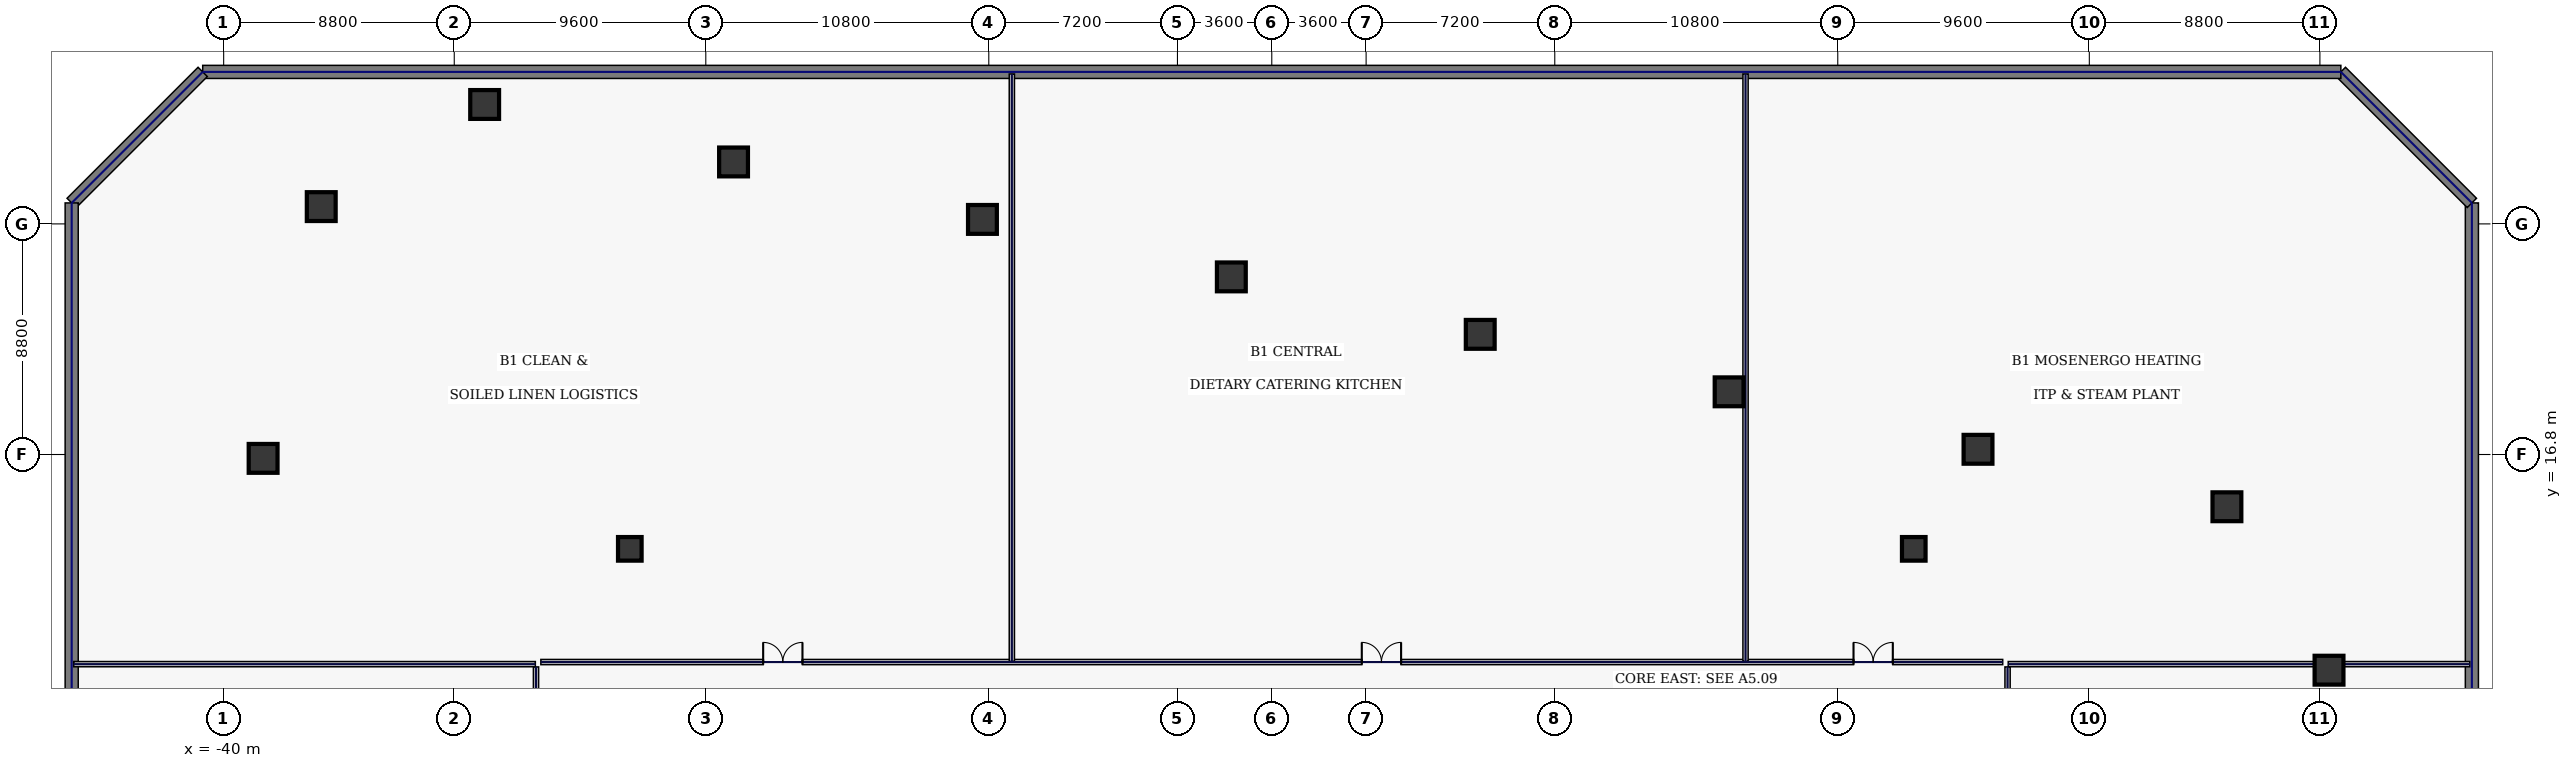
"""IFC4 building model, lengths in metres.
Left out: names, types, materials, properties, quantities, classifications, styles, units other than length and angle.
Written with IfcOpenShell. Run it as: python <this file> out.ifc"""

import sys

from ifc_helpers import new_model, si_unit, direction, frame, frame_2d, origin, origin_2d, place, context, subcontext, project, spatial, rectangle, extrude, element, fill, save


model = new_model("IFC4")
c1 = context("Model", 3, precision=1e-05, world=origin(), true_north=direction((0.0, 1.0)))
c2 = subcontext(c1, "Body", "Model", "MODEL_VIEW")
j1 = project(units=[si_unit("LENGTHUNIT", "METRE"), si_unit("PLANEANGLEUNIT", "RADIAN")], contexts=[c1])
p1 = place(None, origin())
s1 = spatial("IfcSite", under=j1, at=p1, CompositionType="ELEMENT")
p2 = place(p1, origin())
s2 = spatial("IfcBuilding", under=s1, at=p2, CompositionType="ELEMENT")
p3 = place(p2, frame((0.0, 0.0, -5.4)))
s3 = spatial("IfcBuildingStorey", under=s2, at=p3, CompositionType="ELEMENT", Elevation=-5.4)
p4 = place(p3, frame((45.8, -29.8, 0.0), z_axis=(0.0, 0.0, 1.0), x_axis=(0.0, 1.0, 0.0)))
e1 = element("IfcWall", 1, at=p4, inside=s3, PredefinedType="SHEAR", context=c2, shape_type="SweptSolid", body=[
    extrude(rectangle(XDim=56.2, YDim=0.5, at=frame_2d((28.1, 0.0))), origin(), (0.0, 0.0, 1.0), 5.05),
])
p5 = place(p3, frame((45.8, 26.4, 0.0), z_axis=(0.0, 0.0, 1.0), x_axis=(-0.707106781187, 0.707106781187, 0.0)))
e2 = element("IfcWall", 2, at=p5, inside=s3, PredefinedType="SHEAR", context=c2, shape_type="SweptSolid", body=[
    extrude(rectangle(XDim=7.071, YDim=0.5, at=frame_2d((3.536, 0.0))), origin(), (0.0, 0.0, 1.0), 5.05),
])
p6 = place(p3, frame((40.8, 31.4, 0.0), z_axis=(0.0, 0.0, 1.0), x_axis=(-1.0, 0.0, 0.0)))
e3 = element("IfcWall", 3, at=p6, inside=s3, PredefinedType="SHEAR", context=c2, shape_type="SweptSolid", body=[
    extrude(rectangle(XDim=81.6, YDim=0.5, at=frame_2d((40.8, 0.0))), origin(), (0.0, 0.0, 1.0), 5.05),
])
p7 = place(p3, frame((-40.8, 31.4, 0.0), z_axis=(0.0, 0.0, 1.0), x_axis=(-0.707106781187, -0.707106781187, 0.0)))
e4 = element("IfcWall", 4, at=p7, inside=s3, PredefinedType="SHEAR", context=c2, shape_type="SweptSolid", body=[
    extrude(rectangle(XDim=7.071, YDim=0.5, at=frame_2d((3.536, 0.0))), origin(), (0.0, 0.0, 1.0), 5.05),
])
p8 = place(p3, frame((-45.8, 26.4, 0.0), z_axis=(0.0, 0.0, 1.0), x_axis=(0.0, -1.0, 0.0)))
e5 = element("IfcWall", 5, at=p8, inside=s3, PredefinedType="SHEAR", context=c2, shape_type="SweptSolid", body=[
    extrude(rectangle(XDim=56.2, YDim=0.5, at=frame_2d((28.1, 0.0))), origin(), (0.0, 0.0, 1.0), 5.05),
])
for number, where, z_axis, x_axis in (
    (6, (-24.5, 13.2, 0.0), (0.0, 0.0, 1.0), (1.0, 0.0, 0.0)),
    (7, (24.5, 13.2, 0.0), (0.0, 0.0, 1.0), (1.0, 0.0, 0.0)),
):
    element("IfcColumn", number, at=place(p3, frame(where, z_axis=z_axis, x_axis=x_axis)), inside=s3, PredefinedType="COLUMN", context=c2, shape_type="SweptSolid", body=[
        extrude(rectangle(XDim=0.9, YDim=0.9, at=origin_2d()), origin(), (0.0, 0.0, 1.0), 5.05),
    ])
for number, where, z_axis, x_axis in (
    (8, (36.451, 14.806, 0.0), (0.0, 0.0, 1.0), (1.0, 0.0, 0.0)),
    (9, (26.952, 16.999, 0.0), (0.0, 0.0, 1.0), (1.0, 0.0, 0.0)),
    (10, (17.454, 19.192, 0.0), (0.0, 0.0, 1.0), (1.0, 0.0, 0.0)),
    (11, (7.955, 21.385, 0.0), (0.0, 0.0, 1.0), (1.0, 0.0, 0.0)),
    (12, (-1.544, 23.578, 0.0), (0.0, 0.0, 1.0), (1.0, 0.0, 0.0)),
    (13, (-11.042, 25.771, 0.0), (0.0, 0.0, 1.0), (1.0, 0.0, 0.0)),
    (14, (-20.541, 27.964, 0.0), (0.0, 0.0, 1.0), (1.0, 0.0, 0.0)),
    (15, (-30.04, 30.156, 0.0), (0.0, 0.0, 1.0), (1.0, 0.0, 0.0)),
    (16, (40.348, 8.57, 0.0), (0.0, 0.0, 1.0), (1.0, 0.0, 0.0)),
    (17, (-36.276, 26.26, 0.0), (0.0, 0.0, 1.0), (1.0, 0.0, 0.0)),
    (18, (-38.494, 16.652, 0.0), (0.0, 0.0, 1.0), (1.0, 0.0, 0.0)),
):
    element("IfcColumn", number, at=place(p3, frame(where, z_axis=z_axis, x_axis=x_axis)), inside=s3, PredefinedType="COLUMN", context=c2, shape_type="SweptSolid", body=[
        extrude(rectangle(XDim=1.1, YDim=1.1, at=origin_2d()), origin(), (0.0, 0.0, 1.0), 5.05),
    ])
p9 = place(p3, frame((-28.08, -8.695, 0.0), z_axis=(0.0, 0.0, 1.0), x_axis=(0.0, 1.0, 0.0)))
e19 = element("IfcWall", 19, at=p9, inside=s3, PredefinedType="SOLIDWALL", context=c2, shape_type="SweptSolid", body=[
    extrude(rectangle(XDim=17.39, YDim=0.2, at=frame_2d((8.695, 0.0))), origin(), (0.0, 0.0, 1.0), 5.05),
])
p10 = place(p9, frame((10.45, 0.0, 0.0)))
e20 = element("IfcOpeningElement", 20, at=p10, cuts=e19, PredefinedType="OPENING", context=c2, shape_type="SweptSolid", body=[
    extrude(rectangle(XDim=1.5, YDim=2.3, at=frame_2d((0.75, 1.15))), frame((0.0, 0.11, 0.0), z_axis=(0.0, -1.0, 0.0), x_axis=(1.0, 0.0, 0.0)), (0.0, 0.0, 1.0), 0.22),
])
p11 = place(p3, frame((-27.895, 8.88, 0.0), z_axis=(0.0, 0.0, 1.0), x_axis=(1.0, 0.0, 0.0)))
e21 = element("IfcWall", 21, at=p11, inside=s3, PredefinedType="SOLIDWALL", context=c2, shape_type="SweptSolid", body=[
    extrude(rectangle(XDim=55.79, YDim=0.2, at=frame_2d((27.895, 0.0))), origin(), (0.0, 0.0, 1.0), 5.05),
])
p12 = place(p11, frame((8.484, 0.0, 0.0)))
e22 = element("IfcOpeningElement", 22, at=p12, cuts=e21, PredefinedType="OPENING", context=c2, shape_type="SweptSolid", body=[
    extrude(rectangle(XDim=1.5, YDim=2.3, at=frame_2d((0.75, 1.15))), frame((0.0, 0.11, 0.0), z_axis=(0.0, -1.0, 0.0), x_axis=(1.0, 0.0, 0.0)), (0.0, 0.0, 1.0), 0.22),
])
p13 = place(p11, frame((31.33, 0.0, 0.0)))
e23 = element("IfcOpeningElement", 23, at=p13, cuts=e21, PredefinedType="OPENING", context=c2, shape_type="SweptSolid", body=[
    extrude(rectangle(XDim=1.5, YDim=2.3, at=frame_2d((0.75, 1.15))), frame((0.0, 0.11, 0.0), z_axis=(0.0, -1.0, 0.0), x_axis=(1.0, 0.0, 0.0)), (0.0, 0.0, 1.0), 0.22),
])
p14 = place(p11, frame((50.096, 0.0, 0.0)))
e24 = element("IfcOpeningElement", 24, at=p14, cuts=e21, PredefinedType="OPENING", context=c2, shape_type="SweptSolid", body=[
    extrude(rectangle(XDim=1.5, YDim=2.3, at=frame_2d((0.75, 1.15))), frame((0.0, 0.11, 0.0), z_axis=(0.0, -1.0, 0.0), x_axis=(1.0, 0.0, 0.0)), (0.0, 0.0, 1.0), 0.22),
])
p15 = place(p3, frame((28.08, 8.695, 0.0), z_axis=(0.0, 0.0, 1.0), x_axis=(0.0, -1.0, 0.0)))
e25 = element("IfcWall", 25, at=p15, inside=s3, PredefinedType="SOLIDWALL", context=c2, shape_type="SweptSolid", body=[
    extrude(rectangle(XDim=17.39, YDim=0.2, at=frame_2d((8.695, 0.0))), origin(), (0.0, 0.0, 1.0), 5.05),
])
p16 = place(p15, frame((10.45, 0.0, 0.0)))
e26 = element("IfcOpeningElement", 26, at=p16, cuts=e25, PredefinedType="OPENING", context=c2, shape_type="SweptSolid", body=[
    extrude(rectangle(XDim=1.5, YDim=2.3, at=frame_2d((0.75, 1.15))), frame((0.0, 0.11, 0.0), z_axis=(0.0, -1.0, 0.0), x_axis=(1.0, 0.0, 0.0)), (0.0, 0.0, 1.0), 0.22),
])
for number, where, z_axis, x_axis in (
    (27, (-45.72, 8.8, 0.0), (0.0, 0.0, 1.0), (1.0, 0.0, 0.0)),
    (28, (28.105, 8.8, 0.0), (0.0, 0.0, 1.0), (1.0, 0.0, 0.0)),
):
    element("IfcWall", number, at=place(p3, frame(where, z_axis=z_axis, x_axis=x_axis)), inside=s3, PredefinedType="SOLIDWALL", context=c2, shape_type="SweptSolid", body=[
        extrude(rectangle(XDim=17.615, YDim=0.2, at=frame_2d((8.808, 0.0))), origin(), (0.0, 0.0, 1.0), 5.05),
    ])
for number, where, z_axis, x_axis in (
    (29, (-9.92, 8.905, 0.0), (0.0, 0.0, 1.0), (0.0, 1.0, 0.0)),
    (30, (18.08, 8.905, 0.0), (0.0, 0.0, 1.0), (0.0, 1.0, 0.0)),
):
    element("IfcWall", number, at=place(p3, frame(where, z_axis=z_axis, x_axis=x_axis)), inside=s3, PredefinedType="SOLIDWALL", context=c2, shape_type="SweptSolid", body=[
        extrude(rectangle(XDim=22.415, YDim=0.2, at=frame_2d((11.208, 0.0))), origin(), (0.0, 0.0, 1.0), 5.05),
    ])
p17 = place(p12, origin())
e31 = element("IfcDoor", 31, at=p17, inside=s3, OperationType="DOUBLE_SWING_LEFT", PredefinedType="DOOR", context=c2, shape_type="SweptSolid", body=[
    extrude(rectangle(XDim=1.5, YDim=2.3, at=frame_2d((0.75, 1.15))), frame((0.0, 0.025, 0.0), z_axis=(0.0, -1.0, 0.0), x_axis=(1.0, 0.0, 0.0)), (0.0, 0.0, 1.0), 0.05),
])
fill(e22, e31)
p18 = place(p13, origin())
e32 = element("IfcDoor", 32, at=p18, inside=s3, OperationType="DOUBLE_SWING_LEFT", PredefinedType="DOOR", context=c2, shape_type="SweptSolid", body=[
    extrude(rectangle(XDim=1.5, YDim=2.3, at=frame_2d((0.75, 1.15))), frame((0.0, 0.025, 0.0), z_axis=(0.0, -1.0, 0.0), x_axis=(1.0, 0.0, 0.0)), (0.0, 0.0, 1.0), 0.05),
])
fill(e23, e32)
p19 = place(p14, origin())
e33 = element("IfcDoor", 33, at=p19, inside=s3, OperationType="DOUBLE_SWING_LEFT", PredefinedType="DOOR", context=c2, shape_type="SweptSolid", body=[
    extrude(rectangle(XDim=1.5, YDim=2.3, at=frame_2d((0.75, 1.15))), frame((0.0, 0.025, 0.0), z_axis=(0.0, -1.0, 0.0), x_axis=(1.0, 0.0, 0.0)), (0.0, 0.0, 1.0), 0.05),
])
fill(e24, e33)
save(model, sys.argv[1])
